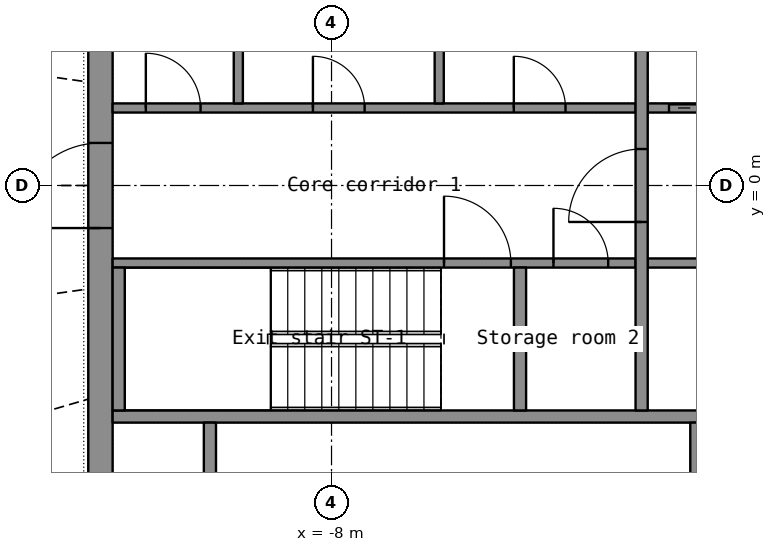
"""IFC4 building model, lengths in metres.
Left out: names, types, materials, properties, quantities, classifications, styles, units other than length and angle.
Written with IfcOpenShell. Run it as: python <this file> out.ifc"""

import sys

from ifc_helpers import new_model, si_unit, direction, frame, frame_2d, origin, place, context, subcontext, project, spatial, rectangle, extrude, element, fill, save


model = new_model("IFC4")
c1 = context("Model", 3, precision=1e-05, world=origin(), true_north=direction((0.0, 1.0)))
c2 = subcontext(c1, "Body", "Model", "MODEL_VIEW")
j1 = project(units=[si_unit("LENGTHUNIT", "METRE"), si_unit("PLANEANGLEUNIT", "RADIAN")], contexts=[c1])
p1 = place(None, origin())
s1 = spatial("IfcSite", under=j1, at=p1, CompositionType="ELEMENT")
p2 = place(p1, origin())
s2 = spatial("IfcBuilding", under=s1, at=p2, CompositionType="ELEMENT")
p3 = place(p2, frame((0.0, 0.0, 220.8)))
s3 = spatial("IfcBuildingStorey", under=s2, at=p3, CompositionType="ELEMENT", Elevation=220.8)
p4 = place(p3, frame((-11.8, -7.2, 0.0), z_axis=(0.0, 0.0, 1.0), x_axis=(0.0, 1.0, 0.0)))
e1 = element("IfcWall", 1, at=p4, inside=s3, PredefinedType="SHEAR", context=c2, shape_type="SweptSolid", body=[
    extrude(rectangle(XDim=14.4, YDim=0.4, at=frame_2d((7.2, 0.0))), origin(), (0.0, 0.0, 1.0), 3.3),
])
p5 = place(p4, frame((6.5, 0.0, 0.0)))
e2 = element("IfcOpeningElement", 2, at=p5, cuts=e1, PredefinedType="OPENING", context=c2, shape_type="SweptSolid", body=[
    extrude(rectangle(XDim=1.4, YDim=2.2, at=frame_2d((0.7, 1.1))), frame((0.0, 0.21, 0.0), z_axis=(0.0, -1.0, 0.0), x_axis=(1.0, 0.0, 0.0)), (0.0, 0.0, 1.0), 0.42),
])
p6 = place(p3, frame((-11.6, -3.8, 0.0), z_axis=(0.0, 0.0, 1.0), x_axis=(1.0, 0.0, 0.0)))
e3 = element("IfcWall", 3, at=p6, inside=s3, PredefinedType="SHEAR", context=c2, shape_type="SweptSolid", body=[
    extrude(rectangle(XDim=23.2, YDim=0.2, at=frame_2d((11.6, 0.0))), origin(), (0.0, 0.0, 1.0), 3.3),
])
p7 = place(p3, frame((-10.0, -6.8, 0.0), z_axis=(0.0, 0.0, 1.0), x_axis=(0.0, 1.0, 0.0)))
e4 = element("IfcWall", 4, at=p7, inside=s3, PredefinedType="SHEAR", context=c2, shape_type="SweptSolid", body=[
    extrude(rectangle(XDim=2.9, YDim=0.2, at=frame_2d((1.45, 0.0))), origin(), (0.0, 0.0, 1.0), 3.3),
])
p8 = place(p3, frame((-2.0, -6.8, 0.0), z_axis=(0.0, 0.0, 1.0), x_axis=(0.0, 1.0, 0.0)))
e5 = element("IfcWall", 5, at=p8, inside=s3, PredefinedType="PARTITIONING", context=c2, shape_type="SweptSolid", body=[
    extrude(rectangle(XDim=2.9, YDim=0.2, at=frame_2d((1.45, 0.0))), origin(), (0.0, 0.0, 1.0), 3.3),
])
p9 = place(p3, frame((-11.6, -1.275, 0.0), z_axis=(0.0, 0.0, 1.0), x_axis=(1.0, 0.0, 0.0)))
e6 = element("IfcWall", 6, at=p9, inside=s3, PredefinedType="SHEAR", context=c2, shape_type="SweptSolid", body=[
    extrude(rectangle(XDim=8.6, YDim=0.15, at=frame_2d((4.3, 0.0))), origin(), (0.0, 0.0, 1.0), 3.3),
])
p10 = place(p9, frame((5.45, 0.0, 0.0)))
e7 = element("IfcOpeningElement", 7, at=p10, cuts=e6, PredefinedType="OPENING", context=c2, shape_type="SweptSolid", body=[
    extrude(rectangle(XDim=1.1, YDim=2.15, at=frame_2d((0.55, 1.075))), frame((0.0, 0.085, 0.0), z_axis=(0.0, -1.0, 0.0), x_axis=(1.0, 0.0, 0.0)), (0.0, 0.0, 1.0), 0.17),
])
p11 = place(p9, frame((7.25, 0.0, 0.0)))
e8 = element("IfcOpeningElement", 8, at=p11, cuts=e6, PredefinedType="OPENING", context=c2, shape_type="SweptSolid", body=[
    extrude(rectangle(XDim=0.9, YDim=2.1, at=frame_2d((0.45, 1.05))), frame((0.0, 0.085, 0.0), z_axis=(0.0, -1.0, 0.0), x_axis=(1.0, 0.0, 0.0)), (0.0, 0.0, 1.0), 0.17),
])
p12 = place(p3, frame((-2.8, -1.275, 0.0), z_axis=(0.0, 0.0, 1.0), x_axis=(1.0, 0.0, 0.0)))
e9 = element("IfcWall", 9, at=p12, inside=s3, PredefinedType="SHEAR", context=c2, shape_type="SweptSolid", body=[
    extrude(rectangle(XDim=5.6, YDim=0.15, at=frame_2d((2.8, 0.0))), origin(), (0.0, 0.0, 1.0), 3.3),
])
p13 = place(p12, frame((4.15, 0.0, 0.0)))
e10 = element("IfcOpeningElement", 10, at=p13, cuts=e9, PredefinedType="OPENING", context=c2, shape_type="SweptSolid", body=[
    extrude(rectangle(XDim=1.1, YDim=2.2, at=frame_2d((0.55, 1.1))), frame((0.0, 0.085, 0.0), z_axis=(0.0, -1.0, 0.0), x_axis=(1.0, 0.0, 0.0)), (0.0, 0.0, 1.0), 0.17),
])
p14 = place(p12, frame((1.35, 0.0, 0.0)))
e11 = element("IfcOpeningElement", 11, at=p14, cuts=e9, PredefinedType="OPENING", context=c2, shape_type="SweptSolid", body=[
    extrude(rectangle(XDim=0.9, YDim=2.1, at=frame_2d((0.45, 1.05))), frame((0.0, 0.085, 0.0), z_axis=(0.0, -1.0, 0.0), x_axis=(1.0, 0.0, 0.0)), (0.0, 0.0, 1.0), 0.17),
])
p15 = place(p3, frame((-11.6, 1.275, 0.0), z_axis=(0.0, 0.0, 1.0), x_axis=(1.0, 0.0, 0.0)))
e12 = element("IfcWall", 12, at=p15, inside=s3, PredefinedType="PARTITIONING", context=c2, shape_type="SweptSolid", body=[
    extrude(rectangle(XDim=8.6, YDim=0.15, at=frame_2d((4.3, 0.0))), origin(), (0.0, 0.0, 1.0), 3.3),
])
p16 = place(p15, frame((0.546, 0.0, 0.0)))
e13 = element("IfcOpeningElement", 13, at=p16, cuts=e12, PredefinedType="OPENING", context=c2, shape_type="SweptSolid", body=[
    extrude(rectangle(XDim=0.9, YDim=2.1, at=frame_2d((0.45, 1.05))), frame((0.0, 0.085, 0.0), z_axis=(0.0, -1.0, 0.0), x_axis=(1.0, 0.0, 0.0)), (0.0, 0.0, 1.0), 0.17),
])
p17 = place(p15, frame((3.294, 0.0, 0.0)))
e14 = element("IfcOpeningElement", 14, at=p17, cuts=e12, PredefinedType="OPENING", context=c2, shape_type="SweptSolid", body=[
    extrude(rectangle(XDim=0.85, YDim=2.1, at=frame_2d((0.425, 1.05))), frame((0.0, 0.085, 0.0), z_axis=(0.0, -1.0, 0.0), x_axis=(1.0, 0.0, 0.0)), (0.0, 0.0, 1.0), 0.17),
])
p18 = place(p15, frame((6.598, 0.0, 0.0)))
e15 = element("IfcOpeningElement", 15, at=p18, cuts=e12, PredefinedType="OPENING", context=c2, shape_type="SweptSolid", body=[
    extrude(rectangle(XDim=0.85, YDim=2.1, at=frame_2d((0.425, 1.05))), frame((0.0, 0.085, 0.0), z_axis=(0.0, -1.0, 0.0), x_axis=(1.0, 0.0, 0.0)), (0.0, 0.0, 1.0), 0.17),
])
p19 = place(p3, frame((-2.8, 1.275, 0.0), z_axis=(0.0, 0.0, 1.0), x_axis=(1.0, 0.0, 0.0)))
e16 = element("IfcWall", 16, at=p19, inside=s3, PredefinedType="SHEAR", context=c2, shape_type="SweptSolid", body=[
    extrude(rectangle(XDim=5.6, YDim=0.15, at=frame_2d((2.8, 0.0))), origin(), (0.0, 0.0, 1.0), 3.3),
])
p20 = place(p19, frame((0.35, 0.0, 0.0)))
e17 = element("IfcOpeningElement", 17, at=p20, cuts=e16, PredefinedType="OPENING", context=c2, shape_type="SweptSolid", body=[
    extrude(rectangle(XDim=1.1, YDim=2.2, at=frame_2d((0.55, 1.1))), frame((0.0, 0.085, 0.0), z_axis=(0.0, -1.0, 0.0), x_axis=(1.0, 0.0, 0.0)), (0.0, 0.0, 1.0), 0.17),
])
p21 = place(p19, frame((2.326, 0.0, 0.0)))
e18 = element("IfcOpeningElement", 18, at=p21, cuts=e16, PredefinedType="OPENING", context=c2, shape_type="SweptSolid", body=[
    extrude(rectangle(XDim=0.9, YDim=2.1, at=frame_2d((0.45, 1.05))), frame((0.0, 0.085, 0.0), z_axis=(0.0, -1.0, 0.0), x_axis=(1.0, 0.0, 0.0)), (0.0, 0.0, 1.0), 0.17),
])
p22 = place(p19, frame((4.201, 0.0, 0.0)))
e19 = element("IfcOpeningElement", 19, at=p22, cuts=e16, PredefinedType="OPENING", context=c2, shape_type="SweptSolid", body=[
    extrude(rectangle(XDim=0.9, YDim=2.1, at=frame_2d((0.45, 1.05))), frame((0.0, 0.085, 0.0), z_axis=(0.0, -1.0, 0.0), x_axis=(1.0, 0.0, 0.0)), (0.0, 0.0, 1.0), 0.17),
])
p23 = place(p3, frame((-2.9, -3.7, 0.0), z_axis=(0.0, 0.0, 1.0), x_axis=(0.0, 1.0, 0.0)))
e20 = element("IfcWall", 20, at=p23, inside=s3, PredefinedType="SHEAR", context=c2, shape_type="SweptSolid", body=[
    extrude(rectangle(XDim=7.4, YDim=0.2, at=frame_2d((3.7, 0.0))), origin(), (0.0, 0.0, 1.0), 3.3),
])
p24 = place(p23, frame((3.1, 0.0, 0.0)))
e21 = element("IfcOpeningElement", 21, at=p24, cuts=e20, PredefinedType="OPENING", context=c2, shape_type="SweptSolid", body=[
    extrude(rectangle(XDim=1.2, YDim=2.2, at=frame_2d((0.6, 1.1))), frame((0.0, 0.11, 0.0), z_axis=(0.0, -1.0, 0.0), x_axis=(1.0, 0.0, 0.0)), (0.0, 0.0, 1.0), 0.22),
])
for number, where, z_axis, x_axis in (
    (22, (-11.5, -3.7, 0.0), (0.0, 0.0, 1.0), (0.0, 1.0, 0.0)),
    (23, (-4.9, -3.7, 0.0), (0.0, 0.0, 1.0), (0.0, 1.0, 0.0)),
):
    element("IfcWall", number, at=place(p3, frame(where, z_axis=z_axis, x_axis=x_axis)), inside=s3, PredefinedType="SHEAR", context=c2, shape_type="SweptSolid", body=[
        extrude(rectangle(XDim=2.35, YDim=0.2, at=frame_2d((1.175, 0.0))), origin(), (0.0, 0.0, 1.0), 3.3),
    ])
for number, where, z_axis, x_axis in (
    (24, (-9.533, 1.35, 0.0), (0.0, 0.0, 1.0), (0.0, 1.0, 0.0)),
    (25, (-6.229, 1.35, 0.0), (0.0, 0.0, 1.0), (0.0, 1.0, 0.0)),
):
    element("IfcWall", number, at=place(p3, frame(where, z_axis=z_axis, x_axis=x_axis)), inside=s3, PredefinedType="PARTITIONING", context=c2, shape_type="SweptSolid", body=[
        extrude(rectangle(XDim=2.35, YDim=0.15, at=frame_2d((1.175, 0.0))), origin(), (0.0, 0.0, 1.0), 3.3),
    ])
p25 = place(p5, origin())
e26 = element("IfcDoor", 26, at=p25, inside=s3, OperationType="DOUBLE_DOOR_SINGLE_SWING", PredefinedType="DOOR", context=c2, shape_type="SweptSolid", body=[
    extrude(rectangle(XDim=1.4, YDim=2.2, at=frame_2d((0.7, 1.1))), frame((0.0, 0.025, 0.0), z_axis=(0.0, -1.0, 0.0), x_axis=(1.0, 0.0, 0.0)), (0.0, 0.0, 1.0), 0.05),
])
fill(e2, e26)
p26 = place(p24, origin())
e27 = element("IfcDoor", 27, at=p26, inside=s3, OperationType="SINGLE_SWING_LEFT", PredefinedType="DOOR", context=c2, shape_type="SweptSolid", body=[
    extrude(rectangle(XDim=1.2, YDim=2.2, at=frame_2d((0.6, 1.1))), frame((0.0, 0.025, 0.0), z_axis=(0.0, -1.0, 0.0), x_axis=(1.0, 0.0, 0.0)), (0.0, 0.0, 1.0), 0.05),
])
fill(e21, e27)
p27 = place(p20, origin())
e28 = element("IfcDoor", 28, at=p27, inside=s3, OperationType="DOUBLE_DOOR_SLIDING", PredefinedType="DOOR", context=c2, shape_type="SweptSolid", body=[
    extrude(rectangle(XDim=1.1, YDim=2.2, at=frame_2d((0.55, 1.1))), frame((0.0, 0.025, 0.0), z_axis=(0.0, -1.0, 0.0), x_axis=(1.0, 0.0, 0.0)), (0.0, 0.0, 1.0), 0.05),
])
fill(e17, e28)
p28 = place(p10, origin())
e29 = element("IfcDoor", 29, at=p28, inside=s3, OperationType="SINGLE_SWING_LEFT", PredefinedType="DOOR", context=c2, shape_type="SweptSolid", body=[
    extrude(rectangle(XDim=1.1, YDim=2.15, at=frame_2d((0.55, 1.075))), frame((0.0, 0.025, 0.0), z_axis=(0.0, -1.0, 0.0), x_axis=(1.0, 0.0, 0.0)), (0.0, 0.0, 1.0), 0.05),
])
fill(e7, e29)
p29 = place(p16, origin())
e30 = element("IfcDoor", 30, at=p29, inside=s3, OperationType="SINGLE_SWING_LEFT", PredefinedType="DOOR", context=c2, shape_type="SweptSolid", body=[
    extrude(rectangle(XDim=0.9, YDim=2.1, at=frame_2d((0.45, 1.05))), frame((0.0, 0.025, 0.0), z_axis=(0.0, -1.0, 0.0), x_axis=(1.0, 0.0, 0.0)), (0.0, 0.0, 1.0), 0.05),
])
fill(e13, e30)
p30 = place(p17, origin())
e31 = element("IfcDoor", 31, at=p30, inside=s3, OperationType="SINGLE_SWING_LEFT", PredefinedType="DOOR", context=c2, shape_type="SweptSolid", body=[
    extrude(rectangle(XDim=0.85, YDim=2.1, at=frame_2d((0.425, 1.05))), frame((0.0, 0.025, 0.0), z_axis=(0.0, -1.0, 0.0), x_axis=(1.0, 0.0, 0.0)), (0.0, 0.0, 1.0), 0.05),
])
fill(e14, e31)
p31 = place(p18, origin())
e32 = element("IfcDoor", 32, at=p31, inside=s3, OperationType="SINGLE_SWING_LEFT", PredefinedType="DOOR", context=c2, shape_type="SweptSolid", body=[
    extrude(rectangle(XDim=0.85, YDim=2.1, at=frame_2d((0.425, 1.05))), frame((0.0, 0.025, 0.0), z_axis=(0.0, -1.0, 0.0), x_axis=(1.0, 0.0, 0.0)), (0.0, 0.0, 1.0), 0.05),
])
fill(e15, e32)
p32 = place(p11, origin())
e33 = element("IfcDoor", 33, at=p32, inside=s3, OperationType="SINGLE_SWING_LEFT", PredefinedType="DOOR", context=c2, shape_type="SweptSolid", body=[
    extrude(rectangle(XDim=0.9, YDim=2.1, at=frame_2d((0.45, 1.05))), frame((0.0, 0.025, 0.0), z_axis=(0.0, -1.0, 0.0), x_axis=(1.0, 0.0, 0.0)), (0.0, 0.0, 1.0), 0.05),
])
fill(e8, e33)
save(model, sys.argv[1])
